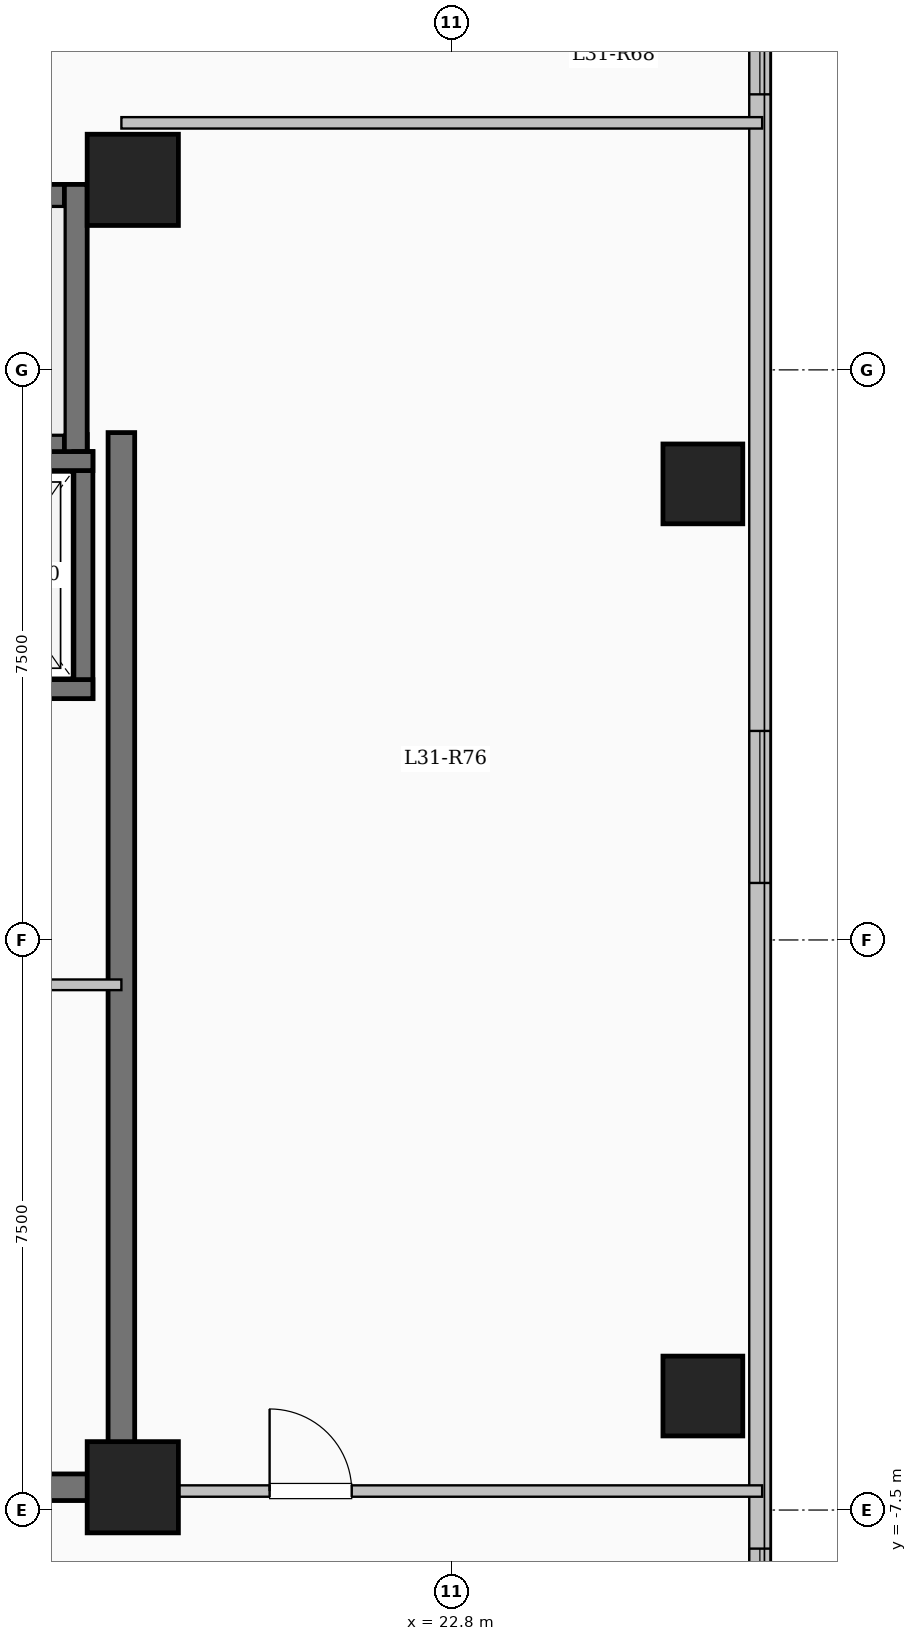
"""IFC4 building model, lengths in metres.
Left out: names, types, materials, properties, quantities, classifications, styles, units other than length and angle.
Written with IfcOpenShell. Run it as: python <this file> out.ifc"""

import sys

from ifc_helpers import new_model, si_unit, direction, frame, frame_2d, origin, origin_2d, place, context, subcontext, project, spatial, rectangle, extrude, element, fill, save


model = new_model("IFC4")
c1 = context("Model", 3, precision=1e-05, world=origin(), true_north=direction((0.0, 1.0)))
c2 = subcontext(c1, "Body", "Model", "MODEL_VIEW")
j1 = project(units=[si_unit("LENGTHUNIT", "METRE"), si_unit("PLANEANGLEUNIT", "RADIAN")], contexts=[c1])
p1 = place(None, origin())
s1 = spatial("IfcSite", under=j1, at=p1, CompositionType="ELEMENT")
p2 = place(p1, origin())
s2 = spatial("IfcBuilding", under=s1, at=p2, CompositionType="ELEMENT")
p3 = place(p2, frame((0.0, 0.0, 115.15)))
s3 = spatial("IfcBuildingStorey", under=s2, at=p3, CompositionType="ELEMENT", Elevation=115.15)
for number, where, z_axis, x_axis in (
    (1, (18.6, -7.2, 0.0), (0.0, 0.0, 1.0), (1.0, 0.0, 0.0)),
    (2, (18.6, 10.0, 0.0), (0.0, 0.0, 1.0), (1.0, 0.0, 0.0)),
):
    element("IfcColumn", number, at=place(p3, frame(where, z_axis=z_axis, x_axis=x_axis)), inside=s3, PredefinedType="COLUMN", context=c2, shape_type="SweptSolid", body=[
        extrude(rectangle(XDim=1.2, YDim=1.2, at=origin_2d()), origin(), (0.0, 0.0, 1.0), 3.35),
    ])
for number, where, z_axis, x_axis in (
    (3, (26.1, -6.0, 0.0), (0.0, 0.0, 1.0), (1.0, 0.0, 0.0)),
    (4, (26.1, 6.0, 0.0), (0.0, 0.0, 1.0), (1.0, 0.0, 0.0)),
):
    element("IfcColumn", number, at=place(p3, frame(where, z_axis=z_axis, x_axis=x_axis)), inside=s3, PredefinedType="COLUMN", context=c2, shape_type="SweptSolid", body=[
        extrude(rectangle(XDim=1.05, YDim=1.05, at=origin_2d()), origin(), (0.0, 0.0, 1.0), 3.35),
    ])
p4 = place(p3, frame((26.85, 17.85, 0.0), z_axis=(0.0, 0.0, 1.0), x_axis=(0.0, -1.0, 0.0)))
e5 = element("IfcWall", 5, at=p4, inside=s3, PredefinedType="SOLIDWALL", context=c2, shape_type="SweptSolid", body=[
    extrude(rectangle(XDim=35.7, YDim=0.28, at=frame_2d((17.85, 0.0))), origin(), (0.0, 0.0, 1.0), 3.05),
])
p5 = place(p4, frame((1.675, 0.0, 0.9)))
e6 = element("IfcOpeningElement", 6, at=p5, cuts=e5, PredefinedType="OPENING", context=c2, shape_type="SweptSolid", body=[
    extrude(rectangle(XDim=2.0, YDim=1.7, at=frame_2d((1.0, 0.85))), frame((0.0, 0.15, 0.0), z_axis=(0.0, -1.0, 0.0), x_axis=(1.0, 0.0, 0.0)), (0.0, 0.0, 1.0), 0.3),
])
p6 = place(p4, frame((5.725, 0.0, 0.95)))
e7 = element("IfcOpeningElement", 7, at=p6, cuts=e5, PredefinedType="OPENING", context=c2, shape_type="SweptSolid", body=[
    extrude(rectangle(XDim=1.0, YDim=1.5, at=frame_2d((0.5, 0.75))), frame((0.0, 0.15, 0.0), z_axis=(0.0, -1.0, 0.0), x_axis=(1.0, 0.0, 0.0)), (0.0, 0.0, 1.0), 0.3),
])
p7 = place(p4, frame((15.1, 0.0, 0.9)))
e8 = element("IfcOpeningElement", 8, at=p7, cuts=e5, PredefinedType="OPENING", context=c2, shape_type="SweptSolid", body=[
    extrude(rectangle(XDim=2.0, YDim=1.7, at=frame_2d((1.0, 0.85))), frame((0.0, 0.15, 0.0), z_axis=(0.0, -1.0, 0.0), x_axis=(1.0, 0.0, 0.0)), (0.0, 0.0, 1.0), 0.3),
])
p8 = place(p4, frame((25.857, 0.0, 0.9)))
e9 = element("IfcOpeningElement", 9, at=p8, cuts=e5, PredefinedType="OPENING", context=c2, shape_type="SweptSolid", body=[
    extrude(rectangle(XDim=1.5, YDim=1.65, at=frame_2d((0.75, 0.825))), frame((0.0, 0.15, 0.0), z_axis=(0.0, -1.0, 0.0), x_axis=(1.0, 0.0, 0.0)), (0.0, 0.0, 1.0), 0.3),
])
p9 = place(p4, frame((30.75, 0.0, 0.9)))
e10 = element("IfcOpeningElement", 10, at=p9, cuts=e5, PredefinedType="OPENING", context=c2, shape_type="SweptSolid", body=[
    extrude(rectangle(XDim=2.4, YDim=1.8, at=frame_2d((1.2, 0.9))), frame((0.0, 0.15, 0.0), z_axis=(0.0, -1.0, 0.0), x_axis=(1.0, 0.0, 0.0)), (0.0, 0.0, 1.0), 0.3),
])
p10 = place(p3, frame((10.0, 9.79, 0.0), z_axis=(0.0, 0.0, 1.0), x_axis=(1.0, 0.0, 0.0)))
e11 = element("IfcWall", 11, at=p10, inside=s3, PredefinedType="SHEAR", context=c2, shape_type="SweptSolid", body=[
    extrude(rectangle(XDim=8.0, YDim=0.3, at=frame_2d((4.0, 0.0))), origin(), (0.0, 0.0, 1.0), 3.35),
])
p11 = place(p3, frame((10.0, 6.5, 0.0), z_axis=(0.0, 0.0, 1.0), x_axis=(1.0, 0.0, 0.0)))
e12 = element("IfcWall", 12, at=p11, inside=s3, PredefinedType="SHEAR", context=c2, shape_type="SweptSolid", body=[
    extrude(rectangle(XDim=8.0, YDim=0.3, at=frame_2d((4.0, 0.0))), origin(), (0.0, 0.0, 1.0), 3.35),
])
p12 = place(p11, frame((0.55, 0.0, 0.0)))
e13 = element("IfcOpeningElement", 13, at=p12, cuts=e12, PredefinedType="OPENING", context=c2, shape_type="SweptSolid", body=[
    extrude(rectangle(XDim=1.0, YDim=2.15, at=frame_2d((0.5, 1.075))), frame((0.0, 0.16, 0.0), z_axis=(0.0, -1.0, 0.0), x_axis=(1.0, 0.0, 0.0)), (0.0, 0.0, 1.0), 0.32),
])
p13 = place(p3, frame((17.85, 6.35, 0.0), z_axis=(0.0, 0.0, 1.0), x_axis=(0.0, 1.0, 0.0)))
e14 = element("IfcWall", 14, at=p13, inside=s3, PredefinedType="SHEAR", context=c2, shape_type="SweptSolid", body=[
    extrude(rectangle(XDim=3.59, YDim=0.3, at=frame_2d((1.795, 0.0))), origin(), (0.0, 0.0, 1.0), 3.35),
])
p14 = place(p3, frame((17.95, 3.175, 0.0), z_axis=(0.0, 0.0, 1.0), x_axis=(0.0, 1.0, 0.0)))
e15 = element("IfcWall", 15, at=p14, inside=s3, PredefinedType="SHEAR", context=c2, shape_type="SweptSolid", body=[
    extrude(rectangle(XDim=3.25, YDim=0.25, at=frame_2d((1.625, 0.0))), origin(), (0.0, 0.0, 1.0), 3.35),
])
for number, where, z_axis, x_axis in (
    (16, (15.525, 3.3, 0.0), (0.0, 0.0, 1.0), (1.0, 0.0, 0.0)),
    (17, (15.525, 6.3, 0.0), (0.0, 0.0, 1.0), (1.0, 0.0, 0.0)),
):
    element("IfcWall", number, at=place(p3, frame(where, z_axis=z_axis, x_axis=x_axis)), inside=s3, PredefinedType="SHEAR", context=c2, shape_type="SweptSolid", body=[
        extrude(rectangle(XDim=2.55, YDim=0.25, at=frame_2d((1.275, 0.0))), origin(), (0.0, 0.0, 1.0), 3.35),
    ])
p15 = place(p3, frame((18.45, -7.375, 0.0), z_axis=(0.0, 0.0, 1.0), x_axis=(0.0, 1.0, 0.0)))
e18 = element("IfcWall", 18, at=p15, inside=s3, PredefinedType="SHEAR", context=c2, shape_type="SweptSolid", body=[
    extrude(rectangle(XDim=14.05, YDim=0.35, at=frame_2d((7.025, 0.0))), origin(), (0.0, 0.0, 1.0), 3.35),
])
p16 = place(p3, frame((10.075, -7.2, 0.0), z_axis=(0.0, 0.0, 1.0), x_axis=(1.0, 0.0, 0.0)))
e19 = element("IfcWall", 19, at=p16, inside=s3, PredefinedType="SHEAR", context=c2, shape_type="SweptSolid", body=[
    extrude(rectangle(XDim=8.55, YDim=0.35, at=frame_2d((4.275, 0.0))), origin(), (0.0, 0.0, 1.0), 3.35),
])
p17 = place(p3, frame((15.4, -0.59, 0.0), z_axis=(0.0, 0.0, 1.0), x_axis=(1.0, 0.0, 0.0)))
e20 = element("IfcWall", 20, at=p17, inside=s3, PredefinedType="PARTITIONING", context=c2, shape_type="SweptSolid", body=[
    extrude(rectangle(XDim=3.05, YDim=0.14, at=frame_2d((1.525, 0.0))), origin(), (0.0, 0.0, 1.0), 3.05),
])
p18 = place(p17, frame((1.05, 0.0, 0.0)))
e21 = element("IfcOpeningElement", 21, at=p18, cuts=e20, PredefinedType="OPENING", context=c2, shape_type="SweptSolid", body=[
    extrude(rectangle(XDim=0.9, YDim=2.08, at=frame_2d((0.45, 1.04))), frame((0.0, 0.08, 0.0), z_axis=(0.0, -1.0, 0.0), x_axis=(1.0, 0.0, 0.0)), (0.0, 0.0, 1.0), 0.16),
])
p19 = place(p3, frame((18.45, -7.25, 0.0), z_axis=(0.0, 0.0, 1.0), x_axis=(1.0, 0.0, 0.0)))
e22 = element("IfcWall", 22, at=p19, inside=s3, PredefinedType="PARTITIONING", context=c2, shape_type="SweptSolid", body=[
    extrude(rectangle(XDim=8.43, YDim=0.15, at=frame_2d((4.215, 0.0))), origin(), (0.0, 0.0, 1.0), 3.05),
])
p20 = place(p19, frame((1.95, 0.0, 0.0)))
e23 = element("IfcOpeningElement", 23, at=p20, cuts=e22, PredefinedType="OPENING", context=c2, shape_type="SweptSolid", body=[
    extrude(rectangle(XDim=1.08, YDim=2.15, at=frame_2d((0.54, 1.075))), frame((0.0, 0.085, 0.0), z_axis=(0.0, -1.0, 0.0), x_axis=(1.0, 0.0, 0.0)), (0.0, 0.0, 1.0), 0.17),
])
p21 = place(p3, frame((18.45, 10.75, 0.0), z_axis=(0.0, 0.0, 1.0), x_axis=(1.0, 0.0, 0.0)))
e24 = element("IfcWall", 24, at=p21, inside=s3, PredefinedType="PARTITIONING", context=c2, shape_type="SweptSolid", body=[
    extrude(rectangle(XDim=8.43, YDim=0.15, at=frame_2d((4.215, 0.0))), origin(), (0.0, 0.0, 1.0), 3.05),
])
p22 = place(p6, origin())
e25 = element("IfcWindow", 25, at=p22, inside=s3, PartitioningType="SINGLE_PANEL", PredefinedType="WINDOW", context=c2, shape_type="SweptSolid", body=[
    extrude(rectangle(XDim=1.0, YDim=1.5, at=frame_2d((0.5, 0.75))), frame((0.0, 0.03, 0.0), z_axis=(0.0, -1.0, 0.0), x_axis=(1.0, 0.0, 0.0)), (0.0, 0.0, 1.0), 0.06),
])
fill(e7, e25)
p23 = place(p7, origin())
e26 = element("IfcWindow", 26, at=p23, inside=s3, PartitioningType="SINGLE_PANEL", PredefinedType="WINDOW", context=c2, shape_type="SweptSolid", body=[
    extrude(rectangle(XDim=2.0, YDim=1.7, at=frame_2d((1.0, 0.85))), frame((0.0, 0.03, 0.0), z_axis=(0.0, -1.0, 0.0), x_axis=(1.0, 0.0, 0.0)), (0.0, 0.0, 1.0), 0.06),
])
fill(e8, e26)
p24 = place(p8, origin())
e27 = element("IfcWindow", 27, at=p24, inside=s3, PartitioningType="SINGLE_PANEL", PredefinedType="WINDOW", context=c2, shape_type="SweptSolid", body=[
    extrude(rectangle(XDim=1.5, YDim=1.65, at=frame_2d((0.75, 0.825))), frame((0.0, 0.03, 0.0), z_axis=(0.0, -1.0, 0.0), x_axis=(1.0, 0.0, 0.0)), (0.0, 0.0, 1.0), 0.06),
])
fill(e9, e27)
p25 = place(p20, origin())
e28 = element("IfcDoor", 28, at=p25, inside=s3, OperationType="SINGLE_SWING_LEFT", PredefinedType="DOOR", context=c2, shape_type="SweptSolid", body=[
    extrude(rectangle(XDim=1.08, YDim=2.15, at=frame_2d((0.54, 1.075))), frame((0.0, 0.025, 0.0), z_axis=(0.0, -1.0, 0.0), x_axis=(1.0, 0.0, 0.0)), (0.0, 0.0, 1.0), 0.05),
])
fill(e23, e28)
save(model, sys.argv[1])
